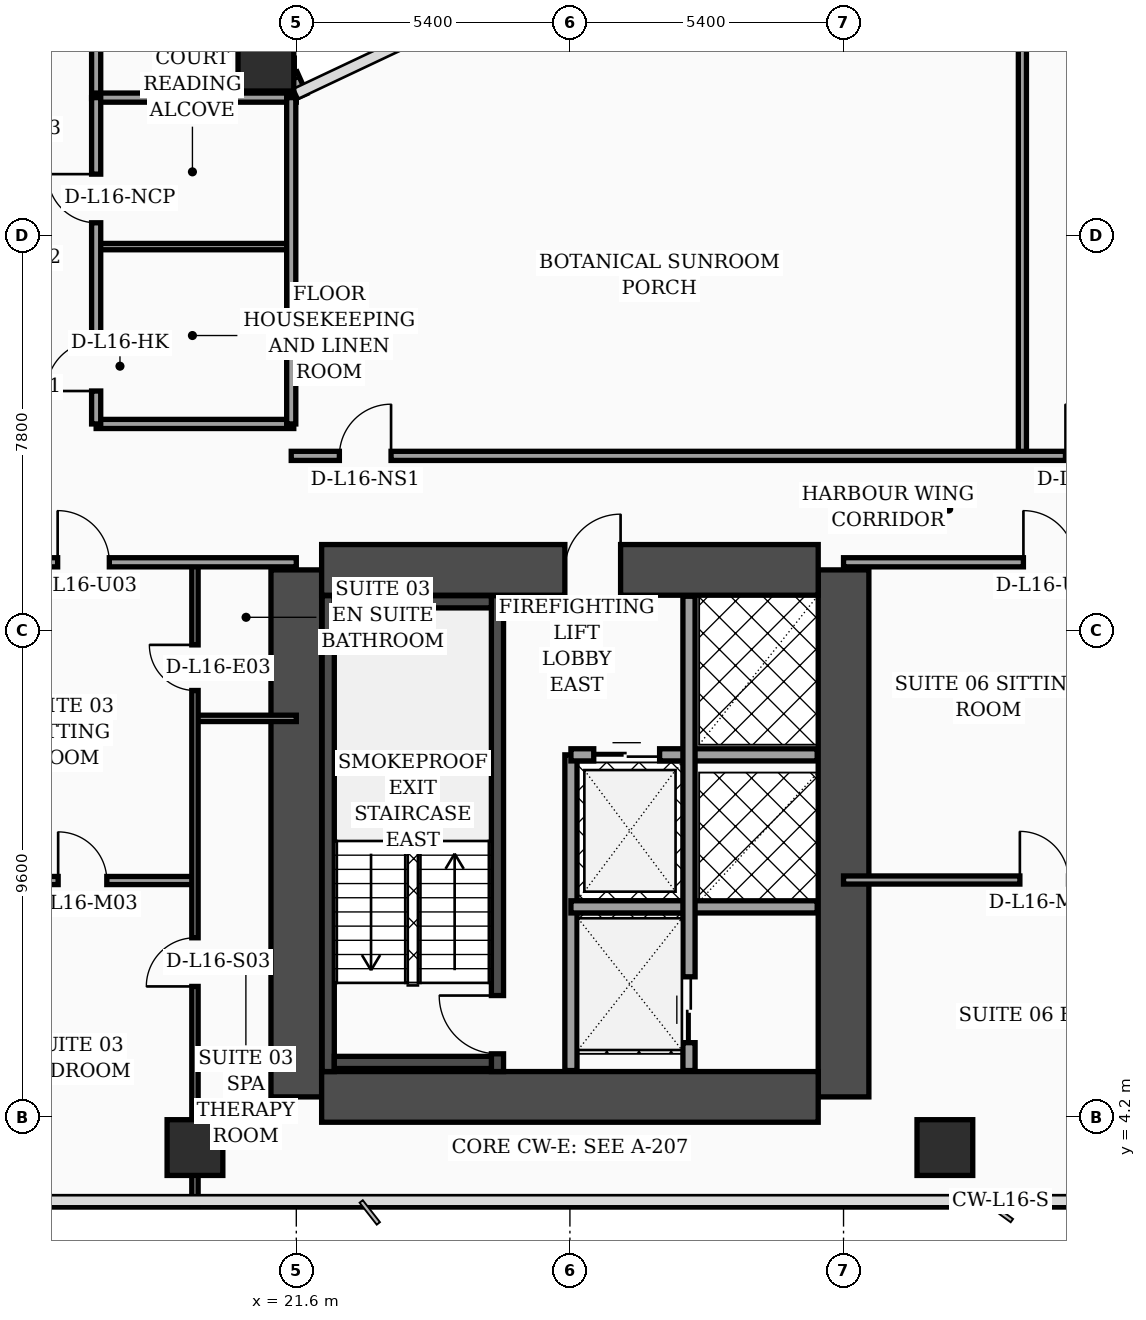
"""IFC4 building model, lengths in metres.
Left out: names, types, materials, properties, quantities, classifications, styles, units other than length and angle.
Written with IfcOpenShell. Run it as: python <this file> out.ifc"""

import sys

from ifc_helpers import new_model, si_unit, direction, frame, frame_2d, origin, origin_2d, place, context, subcontext, project, spatial, rectangle, hollow_rectangle, extrude, element, fill, save


model = new_model("IFC4")
c1 = context("Model", 3, precision=1e-05, world=origin(), true_north=direction((0.0, 1.0)))
c2 = subcontext(c1, "Body", "Model", "MODEL_VIEW")
j1 = project(units=[si_unit("LENGTHUNIT", "METRE"), si_unit("PLANEANGLEUNIT", "RADIAN")], contexts=[c1])
p1 = place(None, origin())
s1 = spatial("IfcSite", under=j1, at=p1, CompositionType="ELEMENT")
p2 = place(p1, origin())
s2 = spatial("IfcBuilding", under=s1, at=p2, CompositionType="ELEMENT")
p3 = place(p2, frame((0.0, 0.0, 69.8)))
s3 = spatial("IfcBuildingStorey", under=s2, at=p3, CompositionType="ELEMENT", Elevation=69.8)
for number, where, z_axis, x_axis in (
    (1, (21.6, 4.6, 0.0), (0.0, 0.0, 1.0), (0.0, 1.0, 0.0)),
    (2, (32.4, 4.6, 0.0), (0.0, 0.0, 1.0), (0.0, 1.0, 0.0)),
):
    element("IfcWall", number, at=place(p3, frame(where, z_axis=z_axis, x_axis=x_axis)), inside=s3, PredefinedType="SHEAR", context=c2, shape_type="SweptSolid", body=[
        extrude(rectangle(XDim=10.4, YDim=1.0, at=frame_2d((5.2, 0.0))), origin(), (0.0, 0.0, 1.0), 3.56),
    ])
p4 = place(p3, frame((22.1, 15.0, 0.0), z_axis=(0.0, 0.0, 1.0), x_axis=(1.0, 0.0, 0.0)))
e3 = element("IfcWall", 3, at=p4, inside=s3, PredefinedType="SHEAR", context=c2, shape_type="SweptSolid", body=[
    extrude(rectangle(XDim=9.8, YDim=1.0, at=frame_2d((4.9, 0.0))), origin(), (0.0, 0.0, 1.0), 3.56),
])
p5 = place(p4, frame((4.8, 0.0, 0.0)))
e4 = element("IfcOpeningElement", 4, at=p5, cuts=e3, PredefinedType="OPENING", context=c2, shape_type="SweptSolid", body=[
    extrude(rectangle(XDim=1.1, YDim=2.2, at=frame_2d((0.55, 1.1))), frame((0.0, 0.51, 0.0), z_axis=(0.0, -1.0, 0.0), x_axis=(1.0, 0.0, 0.0)), (0.0, 0.0, 1.0), 1.02),
])
p6 = place(p3, frame((22.1, 4.6, 0.0), z_axis=(0.0, 0.0, 1.0), x_axis=(1.0, 0.0, 0.0)))
e5 = element("IfcWall", 5, at=p6, inside=s3, PredefinedType="SHEAR", context=c2, shape_type="SweptSolid", body=[
    extrude(rectangle(XDim=9.8, YDim=1.0, at=frame_2d((4.9, 0.0))), origin(), (0.0, 0.0, 1.0), 3.56),
])
p7 = place(p3, frame((22.23, 5.1, 0.0), z_axis=(0.0, 0.0, 1.0), x_axis=(0.0, 1.0, 0.0)))
e6 = element("IfcWall", 6, at=p7, inside=s3, PredefinedType="SOLIDWALL", context=c2, shape_type="SweptSolid", body=[
    extrude(rectangle(XDim=9.39, YDim=0.24, at=frame_2d((4.695, 0.0))), origin(), (0.0, 0.0, 1.0), 3.56),
])
p8 = place(p3, frame((25.57, 5.1, 0.0), z_axis=(0.0, 0.0, 1.0), x_axis=(0.0, 1.0, 0.0)))
e7 = element("IfcWall", 7, at=p8, inside=s3, PredefinedType="SOLIDWALL", context=c2, shape_type="SweptSolid", body=[
    extrude(rectangle(XDim=9.39, YDim=0.24, at=frame_2d((4.695, 0.0))), origin(), (0.0, 0.0, 1.0), 3.56),
])
p9 = place(p8, frame((0.35, 0.0, 0.0)))
e8 = element("IfcOpeningElement", 8, at=p9, cuts=e7, PredefinedType="OPENING", context=c2, shape_type="SweptSolid", body=[
    extrude(rectangle(XDim=1.15, YDim=2.2, at=frame_2d((0.575, 1.1))), frame((0.0, 0.13, 0.0), z_axis=(0.0, -1.0, 0.0), x_axis=(1.0, 0.0, 0.0)), (0.0, 0.0, 1.0), 0.26),
])
for number, where, z_axis, x_axis in (
    (9, (22.35, 5.28, 0.0), (0.0, 0.0, 1.0), (1.0, 0.0, 0.0)),
    (10, (22.35, 14.37, 0.0), (0.0, 0.0, 1.0), (1.0, 0.0, 0.0)),
):
    element("IfcWall", number, at=place(p3, frame(where, z_axis=z_axis, x_axis=x_axis)), inside=s3, PredefinedType="SOLIDWALL", context=c2, shape_type="SweptSolid", body=[
        extrude(rectangle(XDim=3.1, YDim=0.24, at=frame_2d((1.55, 0.0))), origin(), (0.0, 0.0, 1.0), 3.56),
    ])
for number, where, z_axis, x_axis in (
    (11, (21.0, 25.0, 0.0), (0.0, 0.0, 1.0), (1.0, 0.0, 0.0)),
    (12, (19.6, 3.6, 0.0), (0.0, 0.0, 1.0), (1.0, 0.0, 0.0)),
    (13, (34.4, 3.6, 0.0), (0.0, 0.0, 1.0), (1.0, 0.0, 0.0)),
):
    element("IfcColumn", number, at=place(p3, frame(where, z_axis=z_axis, x_axis=x_axis)), inside=s3, PredefinedType="COLUMN", context=c2, shape_type="SweptSolid", body=[
        extrude(hollow_rectangle(XDim=1.1, YDim=1.1, WallThickness=0.045, at=origin_2d()), origin(), (0.0, 0.0, 1.0), 3.56),
    ])
p10 = place(p3, frame((21.68, 24.34, 0.0), z_axis=(0.0, 0.0, 1.0), x_axis=(-0.40758134973, 0.913168901875, 0.0)))
e14 = element("IfcWall", 14, at=p10, inside=s3, PredefinedType="SOLIDWALL", context=c2, shape_type="SweptSolid", body=[
    extrude(rectangle(XDim=0.471, YDim=0.28, at=frame_2d((0.235, 0.0))), origin(), (0.0, 0.0, 1.0), 3.56),
])
p11 = place(p3, frame((27.02, 5.12, 0.0), z_axis=(0.0, 0.0, 1.0), x_axis=(0.0, 1.0, 0.0)))
e15 = element("IfcWall", 15, at=p11, inside=s3, PredefinedType="SOLIDWALL", context=c2, shape_type="SweptSolid", body=[
    extrude(rectangle(XDim=6.23, YDim=0.24, at=frame_2d((3.115, 0.0))), origin(), (0.0, 0.0, 1.0), 3.56),
])
p12 = place(p3, frame((27.02, 11.35, 0.0), z_axis=(0.0, 0.0, 1.0), x_axis=(1.0, 0.0, 0.0)))
e16 = element("IfcWall", 16, at=p12, inside=s3, PredefinedType="SOLIDWALL", context=c2, shape_type="SweptSolid", body=[
    extrude(rectangle(XDim=4.86, YDim=0.24, at=frame_2d((2.43, 0.0))), origin(), (0.0, 0.0, 1.0), 3.56),
])
p13 = place(p12, frame((0.45, 0.0, 0.0)))
e17 = element("IfcOpeningElement", 17, at=p13, cuts=e16, PredefinedType="OPENING", context=c2, shape_type="SweptSolid", body=[
    extrude(rectangle(XDim=1.3, YDim=2.35, at=frame_2d((0.65, 1.175))), frame((0.0, 0.13, 0.0), z_axis=(0.0, -1.0, 0.0), x_axis=(1.0, 0.0, 0.0)), (0.0, 0.0, 1.0), 0.26),
])
p14 = place(p3, frame((27.02, 8.35, 0.0), z_axis=(0.0, 0.0, 1.0), x_axis=(1.0, 0.0, 0.0)))
e18 = element("IfcWall", 18, at=p14, inside=s3, PredefinedType="SOLIDWALL", context=c2, shape_type="SweptSolid", body=[
    extrude(rectangle(XDim=4.86, YDim=0.24, at=frame_2d((2.43, 0.0))), origin(), (0.0, 0.0, 1.0), 3.09),
])
p15 = place(p3, frame((29.35, 5.12, 0.0), z_axis=(0.0, 0.0, 1.0), x_axis=(0.0, 1.0, 0.0)))
e19 = element("IfcWall", 19, at=p15, inside=s3, PredefinedType="SOLIDWALL", context=c2, shape_type="SweptSolid", body=[
    extrude(rectangle(XDim=9.36, YDim=0.24, at=frame_2d((4.68, 0.0))), origin(), (0.0, 0.0, 1.0), 3.56),
])
p16 = place(p15, frame((0.55, 0.0, 0.0)))
e20 = element("IfcOpeningElement", 20, at=p16, cuts=e19, PredefinedType="OPENING", context=c2, shape_type="SweptSolid", body=[
    extrude(rectangle(XDim=1.3, YDim=2.35, at=frame_2d((0.65, 1.175))), frame((0.0, 0.13, 0.0), z_axis=(0.0, -1.0, 0.0), x_axis=(1.0, 0.0, 0.0)), (0.0, 0.0, 1.0), 0.26),
])
p17 = place(p3, frame((19.6, 12.07, 0.0), z_axis=(0.0, 0.0, 1.0), x_axis=(1.0, 0.0, 0.0)))
e21 = element("IfcWall", 21, at=p17, inside=s3, PredefinedType="PARTITIONING", context=c2, shape_type="SweptSolid", body=[
    extrude(rectangle(XDim=2.0, YDim=0.125, at=frame_2d((1.0, 0.0))), origin(), (0.0, 0.0, 1.0), 3.56),
])
p18 = place(p3, frame((15.15, 8.87, 0.0), z_axis=(0.0, 0.0, 1.0), x_axis=(1.0, 0.0, 0.0)))
e22 = element("IfcWall", 22, at=p18, inside=s3, PredefinedType="PARTITIONING", context=c2, shape_type="SweptSolid", body=[
    extrude(rectangle(XDim=4.45, YDim=0.16, at=frame_2d((2.225, 0.0))), origin(), (0.0, 0.0, 1.0), 3.56),
])
p19 = place(p18, frame((1.75, 0.0, 0.0)))
e23 = element("IfcOpeningElement", 23, at=p19, cuts=e22, PredefinedType="OPENING", context=c2, shape_type="SweptSolid", body=[
    extrude(rectangle(XDim=0.96, YDim=2.2, at=frame_2d((0.48, 1.1))), frame((0.0, 0.09, 0.0), z_axis=(0.0, -1.0, 0.0), x_axis=(1.0, 0.0, 0.0)), (0.0, 0.0, 1.0), 0.18),
])
p20 = place(p3, frame((19.6, 2.44, 0.0), z_axis=(0.0, 0.0, 1.0), x_axis=(0.0, 1.0, 0.0)))
e24 = element("IfcWall", 24, at=p20, inside=s3, PredefinedType="PARTITIONING", context=c2, shape_type="SweptSolid", body=[
    extrude(rectangle(XDim=12.71, YDim=0.125, at=frame_2d((6.355, 0.0))), origin(), (0.0, 0.0, 1.0), 2.34),
])
p21 = place(p20, frame((4.34, 0.0, 0.0)))
e25 = element("IfcOpeningElement", 25, at=p21, cuts=e24, PredefinedType="OPENING", context=c2, shape_type="SweptSolid", body=[
    extrude(rectangle(XDim=0.96, YDim=2.2, at=frame_2d((0.48, 1.1))), frame((0.0, 0.073, 0.0), z_axis=(0.0, -1.0, 0.0), x_axis=(1.0, 0.0, 0.0)), (0.0, 0.0, 1.0), 0.145),
])
p22 = place(p20, frame((10.18, 0.0, 0.0)))
e26 = element("IfcOpeningElement", 26, at=p22, cuts=e24, PredefinedType="OPENING", context=c2, shape_type="SweptSolid", body=[
    extrude(rectangle(XDim=0.9, YDim=2.15, at=frame_2d((0.45, 1.075))), frame((0.0, 0.073, 0.0), z_axis=(0.0, -1.0, 0.0), x_axis=(1.0, 0.0, 0.0)), (0.0, 0.0, 1.0), 0.145),
])
p23 = place(p3, frame((15.15, 15.15, 0.0), z_axis=(0.0, 0.0, 1.0), x_axis=(1.0, 0.0, 0.0)))
e27 = element("IfcWall", 27, at=p23, inside=s3, PredefinedType="PARTITIONING", context=c2, shape_type="SweptSolid", body=[
    extrude(rectangle(XDim=6.45, YDim=0.18, at=frame_2d((3.225, 0.0))), origin(), (0.0, 0.0, 1.0), 2.34),
])
p24 = place(p23, frame((1.74, 0.0, 0.0)))
e28 = element("IfcOpeningElement", 28, at=p24, cuts=e27, PredefinedType="OPENING", context=c2, shape_type="SweptSolid", body=[
    extrude(rectangle(XDim=1.02, YDim=2.2, at=frame_2d((0.51, 1.1))), frame((0.0, 0.1, 0.0), z_axis=(0.0, -1.0, 0.0), x_axis=(1.0, 0.0, 0.0)), (0.0, 0.0, 1.0), 0.2),
])
p25 = place(p3, frame((17.65, 24.3, 0.0), z_axis=(0.0, 0.0, 1.0), x_axis=(0.0, 1.0, 0.0)))
e29 = element("IfcWall", 29, at=p25, inside=s3, PredefinedType="PARTITIONING", context=c2, shape_type="SweptSolid", body=[
    extrude(rectangle(XDim=16.4, YDim=0.18, at=frame_2d((8.2, 0.0))), origin(), (0.0, 0.0, 1.0), 2.84),
])
p26 = place(p3, frame((17.65, 17.88, 0.0), z_axis=(0.0, 0.0, 1.0), x_axis=(1.0, 0.0, 0.0)))
e30 = element("IfcWall", 30, at=p26, inside=s3, PredefinedType="PARTITIONING", context=c2, shape_type="SweptSolid", body=[
    extrude(rectangle(XDim=3.9, YDim=0.18, at=frame_2d((1.95, 0.0))), origin(), (0.0, 0.0, 1.0), 3.56),
])
p27 = place(p3, frame((17.65, 21.38, 0.0), z_axis=(0.0, 0.0, 1.0), x_axis=(1.0, 0.0, 0.0)))
e31 = element("IfcWall", 31, at=p27, inside=s3, PredefinedType="PARTITIONING", context=c2, shape_type="SweptSolid", body=[
    extrude(rectangle(XDim=3.9, YDim=0.125, at=frame_2d((1.95, 0.0))), origin(), (0.0, 0.0, 1.0), 3.56),
])
p28 = place(p3, frame((17.65, 24.32, 0.0), z_axis=(0.0, 0.0, 1.0), x_axis=(1.0, 0.0, 0.0)))
e32 = element("IfcWall", 32, at=p28, inside=s3, PredefinedType="PARTITIONING", context=c2, shape_type="SweptSolid", body=[
    extrude(rectangle(XDim=3.95, YDim=0.18, at=frame_2d((1.975, 0.0))), origin(), (0.0, 0.0, 1.0), 3.56),
])
p29 = place(p3, frame((21.5, 17.88, 0.0), z_axis=(0.0, 0.0, 1.0), x_axis=(0.0, 1.0, 0.0)))
e33 = element("IfcWall", 33, at=p29, inside=s3, PredefinedType="PARTITIONING", context=c2, shape_type="SweptSolid", body=[
    extrude(rectangle(XDim=6.44, YDim=0.18, at=frame_2d((3.22, 0.0))), origin(), (0.0, 0.0, 1.0), 3.56),
])
p30 = place(p3, frame((17.65, 17.88, 0.0), z_axis=(0.0, 0.0, 1.0), x_axis=(0.0, 1.0, 0.0)))
e34 = element("IfcWall", 34, at=p30, inside=s3, PredefinedType="PARTITIONING", context=c2, shape_type="SweptSolid", body=[
    extrude(rectangle(XDim=6.44, YDim=0.18, at=frame_2d((3.22, 0.0))), origin(), (0.0, 0.0, 1.0), 3.56),
])
p31 = place(p30, frame((0.65, 0.0, 0.0)))
e35 = element("IfcOpeningElement", 35, at=p31, cuts=e34, PredefinedType="OPENING", context=c2, shape_type="SweptSolid", body=[
    extrude(rectangle(XDim=0.98, YDim=2.15, at=frame_2d((0.49, 1.075))), frame((0.0, 0.1, 0.0), z_axis=(0.0, -1.0, 0.0), x_axis=(1.0, 0.0, 0.0)), (0.0, 0.0, 1.0), 0.2),
])
p32 = place(p30, frame((3.97, 0.0, 0.0)))
e36 = element("IfcOpeningElement", 36, at=p32, cuts=e34, PredefinedType="OPENING", context=c2, shape_type="SweptSolid", body=[
    extrude(rectangle(XDim=0.96, YDim=2.2, at=frame_2d((0.48, 1.1))), frame((0.0, 0.1, 0.0), z_axis=(0.0, -1.0, 0.0), x_axis=(1.0, 0.0, 0.0)), (0.0, 0.0, 1.0), 0.2),
])
p33 = place(p3, frame((32.4, 8.88, 0.0), z_axis=(0.0, 0.0, 1.0), x_axis=(1.0, 0.0, 0.0)))
e37 = element("IfcWall", 37, at=p33, inside=s3, PredefinedType="PARTITIONING", context=c2, shape_type="SweptSolid", body=[
    extrude(rectangle(XDim=7.92, YDim=0.16, at=frame_2d((3.96, 0.0))), origin(), (0.0, 0.0, 1.0), 2.84),
])
p34 = place(p33, frame((3.48, 0.0, 0.0)))
e38 = element("IfcOpeningElement", 38, at=p34, cuts=e37, PredefinedType="OPENING", context=c2, shape_type="SweptSolid", body=[
    extrude(rectangle(XDim=0.96, YDim=2.2, at=frame_2d((0.48, 1.1))), frame((0.0, 0.09, 0.0), z_axis=(0.0, -1.0, 0.0), x_axis=(1.0, 0.0, 0.0)), (0.0, 0.0, 1.0), 0.18),
])
p35 = place(p3, frame((32.4, 15.15, 0.0), z_axis=(0.0, 0.0, 1.0), x_axis=(1.0, 0.0, 0.0)))
e39 = element("IfcWall", 39, at=p35, inside=s3, PredefinedType="PARTITIONING", context=c2, shape_type="SweptSolid", body=[
    extrude(rectangle(XDim=18.9, YDim=0.18, at=frame_2d((9.45, 0.0))), origin(), (0.0, 0.0, 1.0), 2.84),
])
p36 = place(p35, frame((3.55, 0.0, 0.0)))
e40 = element("IfcOpeningElement", 40, at=p36, cuts=e39, PredefinedType="OPENING", context=c2, shape_type="SweptSolid", body=[
    extrude(rectangle(XDim=1.02, YDim=2.2, at=frame_2d((0.51, 1.1))), frame((0.0, 0.1, 0.0), z_axis=(0.0, -1.0, 0.0), x_axis=(1.0, 0.0, 0.0)), (0.0, 0.0, 1.0), 0.2),
])
p37 = place(p35, frame((12.9, 0.0, 0.0)))
e41 = element("IfcOpeningElement", 41, at=p37, cuts=e39, PredefinedType="OPENING", context=c2, shape_type="SweptSolid", body=[
    extrude(rectangle(XDim=1.02, YDim=2.2, at=frame_2d((0.51, 1.1))), frame((0.0, 0.1, 0.0), z_axis=(0.0, -1.0, 0.0), x_axis=(1.0, 0.0, 0.0)), (0.0, 0.0, 1.0), 0.2),
])
p38 = place(p3, frame((35.93, 17.25, 0.0), z_axis=(0.0, 0.0, 1.0), x_axis=(0.0, 1.0, 0.0)))
e42 = element("IfcWall", 42, at=p38, inside=s3, PredefinedType="PARTITIONING", context=c2, shape_type="SweptSolid", body=[
    extrude(rectangle(XDim=14.0, YDim=0.16, at=frame_2d((7.0, 0.0))), origin(), (0.0, 0.0, 1.0), 2.84),
])
p39 = place(p3, frame((21.5, 17.25, 0.0), z_axis=(0.0, 0.0, 1.0), x_axis=(1.0, 0.0, 0.0)))
e43 = element("IfcWall", 43, at=p39, inside=s3, PredefinedType="PARTITIONING", context=c2, shape_type="SweptSolid", body=[
    extrude(rectangle(XDim=27.45, YDim=0.18, at=frame_2d((13.725, 0.0))), origin(), (0.0, 0.0, 1.0), 2.84),
])
p40 = place(p39, frame((0.95, 0.0, 0.0)))
e44 = element("IfcOpeningElement", 44, at=p40, cuts=e43, PredefinedType="OPENING", context=c2, shape_type="SweptSolid", body=[
    extrude(rectangle(XDim=1.02, YDim=2.2, at=frame_2d((0.51, 1.1))), frame((0.0, 0.1, 0.0), z_axis=(0.0, -1.0, 0.0), x_axis=(1.0, 0.0, 0.0)), (0.0, 0.0, 1.0), 0.2),
])
p41 = place(p39, frame((15.28, 0.0, 0.0)))
e45 = element("IfcOpeningElement", 45, at=p41, cuts=e43, PredefinedType="OPENING", context=c2, shape_type="SweptSolid", body=[
    extrude(rectangle(XDim=1.02, YDim=2.2, at=frame_2d((0.51, 1.1))), frame((0.0, 0.1, 0.0), z_axis=(0.0, -1.0, 0.0), x_axis=(1.0, 0.0, 0.0)), (0.0, 0.0, 1.0), 0.2),
])
p42 = place(p13, origin())
e46 = element("IfcDoor", 46, at=p42, inside=s3, OperationType="DOUBLE_DOOR_SLIDING", PredefinedType="DOOR", context=c2, shape_type="SweptSolid", body=[
    extrude(rectangle(XDim=1.3, YDim=2.35, at=frame_2d((0.65, 1.175))), frame((0.0, 0.025, 0.0), z_axis=(0.0, -1.0, 0.0), x_axis=(1.0, 0.0, 0.0)), (0.0, 0.0, 1.0), 0.05),
])
fill(e17, e46)
p43 = place(p16, origin())
e47 = element("IfcDoor", 47, at=p43, inside=s3, OperationType="DOUBLE_DOOR_SLIDING", PredefinedType="DOOR", context=c2, shape_type="SweptSolid", body=[
    extrude(rectangle(XDim=1.3, YDim=2.35, at=frame_2d((0.65, 1.175))), frame((0.0, 0.025, 0.0), z_axis=(0.0, -1.0, 0.0), x_axis=(1.0, 0.0, 0.0)), (0.0, 0.0, 1.0), 0.05),
])
fill(e20, e47)
p44 = place(p19, origin())
e48 = element("IfcDoor", 48, at=p44, inside=s3, OperationType="SINGLE_SWING_LEFT", PredefinedType="DOOR", context=c2, shape_type="SweptSolid", body=[
    extrude(rectangle(XDim=0.96, YDim=2.2, at=frame_2d((0.48, 1.1))), frame((0.0, 0.025, 0.0), z_axis=(0.0, -1.0, 0.0), x_axis=(1.0, 0.0, 0.0)), (0.0, 0.0, 1.0), 0.05),
])
fill(e23, e48)
p45 = place(p21, origin())
e49 = element("IfcDoor", 49, at=p45, inside=s3, OperationType="SINGLE_SWING_LEFT", PredefinedType="DOOR", context=c2, shape_type="SweptSolid", body=[
    extrude(rectangle(XDim=0.96, YDim=2.2, at=frame_2d((0.48, 1.1))), frame((0.0, 0.025, 0.0), z_axis=(0.0, -1.0, 0.0), x_axis=(1.0, 0.0, 0.0)), (0.0, 0.0, 1.0), 0.05),
])
fill(e25, e49)
p46 = place(p22, origin())
e50 = element("IfcDoor", 50, at=p46, inside=s3, OperationType="SINGLE_SWING_RIGHT", PredefinedType="DOOR", context=c2, shape_type="SweptSolid", body=[
    extrude(rectangle(XDim=0.9, YDim=2.15, at=frame_2d((0.45, 1.075))), frame((0.0, 0.025, 0.0), z_axis=(0.0, -1.0, 0.0), x_axis=(1.0, 0.0, 0.0)), (0.0, 0.0, 1.0), 0.05),
])
fill(e26, e50)
p47 = place(p24, origin())
e51 = element("IfcDoor", 51, at=p47, inside=s3, OperationType="SINGLE_SWING_LEFT", PredefinedType="DOOR", context=c2, shape_type="SweptSolid", body=[
    extrude(rectangle(XDim=1.02, YDim=2.2, at=frame_2d((0.51, 1.1))), frame((0.0, 0.025, 0.0), z_axis=(0.0, -1.0, 0.0), x_axis=(1.0, 0.0, 0.0)), (0.0, 0.0, 1.0), 0.05),
])
fill(e28, e51)
p48 = place(p31, origin())
e52 = element("IfcDoor", 52, at=p48, inside=s3, OperationType="SINGLE_SWING_LEFT", PredefinedType="DOOR", context=c2, shape_type="SweptSolid", body=[
    extrude(rectangle(XDim=0.98, YDim=2.15, at=frame_2d((0.49, 1.075))), frame((0.0, 0.025, 0.0), z_axis=(0.0, -1.0, 0.0), x_axis=(1.0, 0.0, 0.0)), (0.0, 0.0, 1.0), 0.05),
])
fill(e35, e52)
p49 = place(p32, origin())
e53 = element("IfcDoor", 53, at=p49, inside=s3, OperationType="SINGLE_SWING_RIGHT", PredefinedType="DOOR", context=c2, shape_type="SweptSolid", body=[
    extrude(rectangle(XDim=0.96, YDim=2.2, at=frame_2d((0.48, 1.1))), frame((0.0, 0.025, 0.0), z_axis=(0.0, -1.0, 0.0), x_axis=(1.0, 0.0, 0.0)), (0.0, 0.0, 1.0), 0.05),
])
fill(e36, e53)
p50 = place(p34, origin())
e54 = element("IfcDoor", 54, at=p50, inside=s3, OperationType="SINGLE_SWING_LEFT", PredefinedType="DOOR", context=c2, shape_type="SweptSolid", body=[
    extrude(rectangle(XDim=0.96, YDim=2.2, at=frame_2d((0.48, 1.1))), frame((0.0, 0.025, 0.0), z_axis=(0.0, -1.0, 0.0), x_axis=(1.0, 0.0, 0.0)), (0.0, 0.0, 1.0), 0.05),
])
fill(e38, e54)
p51 = place(p36, origin())
e55 = element("IfcDoor", 55, at=p51, inside=s3, OperationType="SINGLE_SWING_LEFT", PredefinedType="DOOR", context=c2, shape_type="SweptSolid", body=[
    extrude(rectangle(XDim=1.02, YDim=2.2, at=frame_2d((0.51, 1.1))), frame((0.0, 0.025, 0.0), z_axis=(0.0, -1.0, 0.0), x_axis=(1.0, 0.0, 0.0)), (0.0, 0.0, 1.0), 0.05),
])
fill(e40, e55)
p52 = place(p40, origin())
e56 = element("IfcDoor", 56, at=p52, inside=s3, OperationType="SINGLE_SWING_RIGHT", PredefinedType="DOOR", context=c2, shape_type="SweptSolid", body=[
    extrude(rectangle(XDim=1.02, YDim=2.2, at=frame_2d((0.51, 1.1))), frame((0.0, 0.025, 0.0), z_axis=(0.0, -1.0, 0.0), x_axis=(1.0, 0.0, 0.0)), (0.0, 0.0, 1.0), 0.05),
])
fill(e44, e56)
p53 = place(p41, origin())
e57 = element("IfcDoor", 57, at=p53, inside=s3, OperationType="SINGLE_SWING_LEFT", PredefinedType="DOOR", context=c2, shape_type="SweptSolid", body=[
    extrude(rectangle(XDim=1.02, YDim=2.2, at=frame_2d((0.51, 1.1))), frame((0.0, 0.025, 0.0), z_axis=(0.0, -1.0, 0.0), x_axis=(1.0, 0.0, 0.0)), (0.0, 0.0, 1.0), 0.05),
])
fill(e45, e57)
p54 = place(p9, origin())
e58 = element("IfcDoor", 58, at=p54, inside=s3, OperationType="SINGLE_SWING_RIGHT", PredefinedType="DOOR", context=c2, shape_type="SweptSolid", body=[
    extrude(rectangle(XDim=1.15, YDim=2.2, at=frame_2d((0.575, 1.1))), frame((0.0, 0.025, 0.0), z_axis=(0.0, -1.0, 0.0), x_axis=(1.0, 0.0, 0.0)), (0.0, 0.0, 1.0), 0.05),
])
fill(e8, e58)
p55 = place(p5, origin())
e59 = element("IfcDoor", 59, at=p55, inside=s3, OperationType="SINGLE_SWING_RIGHT", PredefinedType="DOOR", context=c2, shape_type="SweptSolid", body=[
    extrude(rectangle(XDim=1.1, YDim=2.2, at=frame_2d((0.55, 1.1))), frame((0.0, 0.025, 0.0), z_axis=(0.0, -1.0, 0.0), x_axis=(1.0, 0.0, 0.0)), (0.0, 0.0, 1.0), 0.05),
])
fill(e4, e59)
save(model, sys.argv[1])
